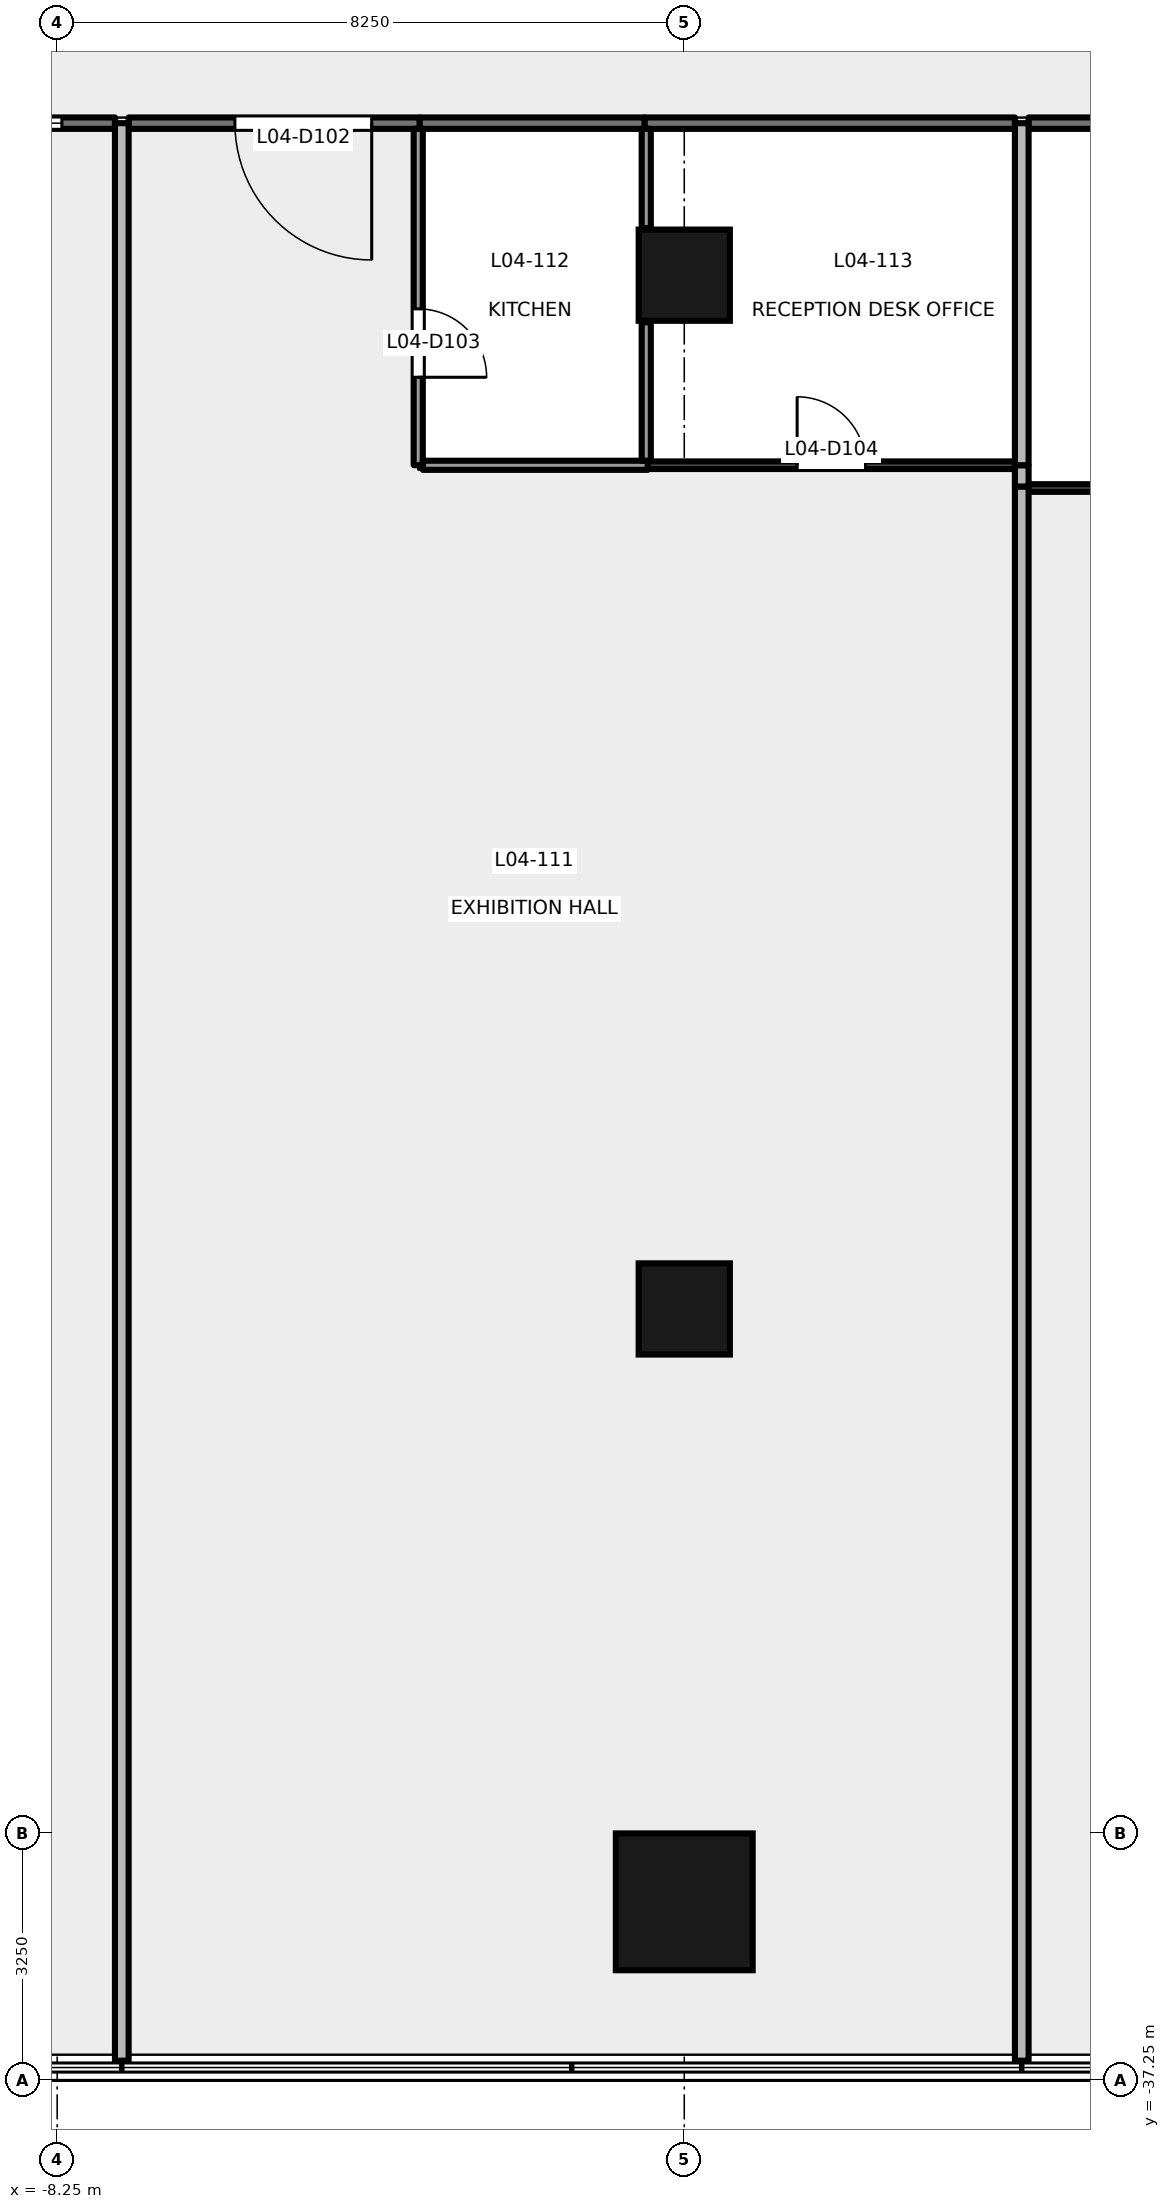
"""IFC4 building model, lengths in metres.
Left out: names, types, materials, properties, quantities, classifications, styles, units other than length and angle.
Written with IfcOpenShell. Run it as: python <this file> out.ifc"""

import sys

from ifc_helpers import new_model, si_unit, direction, frame, frame_2d, origin, origin_2d, place, context, subcontext, project, spatial, rectangle, extrude, element, fill, save


model = new_model("IFC4")
c1 = context("Model", 3, precision=1e-05, world=origin(), true_north=direction((0.0, 1.0)))
c2 = subcontext(c1, "Body", "Model", "MODEL_VIEW")
j1 = project(units=[si_unit("LENGTHUNIT", "METRE"), si_unit("PLANEANGLEUNIT", "RADIAN")], contexts=[c1])
p1 = place(None, origin())
s1 = spatial("IfcSite", under=j1, at=p1, CompositionType="ELEMENT")
p2 = place(p1, origin())
s2 = spatial("IfcBuilding", under=s1, at=p2, CompositionType="ELEMENT")
p3 = place(p2, frame((0.0, 0.0, 22.2)))
s3 = spatial("IfcBuildingStorey", under=s2, at=p3, CompositionType="ELEMENT", Elevation=22.2)
p4 = place(p3, frame((0.0, -34.9, -0.2), z_axis=(0.0, 0.0, 1.0), x_axis=(1.0, 0.0, 0.0)))
e1 = element("IfcColumn", 1, at=p4, inside=s3, PredefinedType="COLUMN", context=c2, shape_type="SweptSolid", body=[
    extrude(rectangle(XDim=1.8, YDim=1.8, at=origin_2d()), origin(), (0.0, 0.0, 1.0), 4.8),
])
for number, where, z_axis, x_axis in (
    (2, (0.0, -27.1, -0.2), (0.0, 0.0, 1.0), (1.0, 0.0, 0.0)),
    (3, (0.0, -13.5, -0.2), (0.0, 0.0, 1.0), (1.0, 0.0, 0.0)),
):
    element("IfcColumn", number, at=place(p3, frame(where, z_axis=z_axis, x_axis=x_axis)), inside=s3, PredefinedType="COLUMN", context=c2, shape_type="SweptSolid", body=[
        extrude(rectangle(XDim=1.2, YDim=1.2, at=origin_2d()), origin(), (0.0, 0.0, 1.0), 4.8),
    ])
p5 = place(p3, frame((-7.49, -11.5, 0.0), z_axis=(0.0, 0.0, 1.0), x_axis=(-1.0, 0.0, 0.0)))
e4 = element("IfcWall", 4, at=p5, inside=s3, PredefinedType="PARTITIONING", context=c2, shape_type="SweptSolid", body=[
    extrude(rectangle(XDim=8.19, YDim=0.15, at=frame_2d((4.095, 0.0))), origin(), (0.0, 0.0, 1.0), 3.6),
])
p6 = place(p5, frame((3.195, 0.0, 0.0)))
e5 = element("IfcOpeningElement", 5, at=p6, cuts=e4, PredefinedType="OPENING", context=c2, shape_type="SweptSolid", body=[
    extrude(rectangle(XDim=1.8, YDim=2.1, at=frame_2d((0.9, 1.05))), frame((0.0, 0.085, 0.0), z_axis=(0.0, -1.0, 0.0), x_axis=(1.0, 0.0, 0.0)), (0.0, 0.0, 1.0), 0.171),
])
p7 = place(p5, frame((0.698, 0.0, 0.0)))
e6 = element("IfcOpeningElement", 6, at=p7, cuts=e4, PredefinedType="OPENING", context=c2, shape_type="SweptSolid", body=[
    extrude(rectangle(XDim=1.8, YDim=2.4, at=frame_2d((0.9, 1.2))), frame((0.0, 0.085, 0.0), z_axis=(0.0, -1.0, 0.0), x_axis=(1.0, 0.0, 0.0)), (0.0, 0.0, 1.0), 0.171),
])
p8 = place(p3, frame((-3.48, -11.5, 0.0), z_axis=(0.0, 0.0, 1.0), x_axis=(-1.0, 0.0, 0.0)))
e7 = element("IfcWall", 7, at=p8, inside=s3, PredefinedType="PARTITIONING", context=c2, shape_type="SweptSolid", body=[
    extrude(rectangle(XDim=3.83, YDim=0.15, at=frame_2d((1.915, 0.0))), origin(), (0.0, 0.0, 1.0), 3.6),
])
p9 = place(p8, frame((0.632, 0.0, 0.0)))
e8 = element("IfcOpeningElement", 8, at=p9, cuts=e7, PredefinedType="OPENING", context=c2, shape_type="SweptSolid", body=[
    extrude(rectangle(XDim=1.8, YDim=2.1, at=frame_2d((0.9, 1.05))), frame((0.0, 0.085, 0.0), z_axis=(0.0, -1.0, 0.0), x_axis=(1.0, 0.0, 0.0)), (0.0, 0.0, 1.0), 0.171),
])
p10 = place(p3, frame((-0.52, -11.5, 0.0), z_axis=(0.0, 0.0, 1.0), x_axis=(-1.0, 0.0, 0.0)))
e9 = element("IfcWall", 9, at=p10, inside=s3, PredefinedType="PARTITIONING", context=c2, shape_type="SweptSolid", body=[
    extrude(rectangle(XDim=2.96, YDim=0.15, at=frame_2d((1.48, 0.0))), origin(), (0.0, 0.0, 1.0), 4.6),
])
p11 = place(p3, frame((4.35, -11.5, 0.0), z_axis=(0.0, 0.0, 1.0), x_axis=(-1.0, 0.0, 0.0)))
e10 = element("IfcWall", 10, at=p11, inside=s3, PredefinedType="PARTITIONING", context=c2, shape_type="SweptSolid", body=[
    extrude(rectangle(XDim=4.87, YDim=0.15, at=frame_2d((2.435, 0.0))), origin(), (0.0, 0.0, 1.0), 3.6),
])
p12 = place(p3, frame((13.46, -11.5, 0.0), z_axis=(0.0, 0.0, 1.0), x_axis=(-1.0, 0.0, 0.0)))
e11 = element("IfcWall", 11, at=p12, inside=s3, PredefinedType="PARTITIONING", context=c2, shape_type="SweptSolid", body=[
    extrude(rectangle(XDim=8.93, YDim=0.15, at=frame_2d((4.465, 0.0))), origin(), (0.0, 0.0, 1.0), 3.6),
])
p13 = place(p3, frame((-7.4, -11.5, 0.0), z_axis=(0.0, 0.0, 1.0), x_axis=(0.0, -1.0, 0.0)))
e12 = element("IfcWall", 12, at=p13, inside=s3, PredefinedType="PARTITIONING", context=c2, shape_type="SweptSolid", body=[
    extrude(rectangle(XDim=25.49, YDim=0.18, at=frame_2d((12.745, 0.0))), origin(), (0.0, 0.0, 1.0), 3.5),
])
p14 = place(p3, frame((-3.5, -11.575, 0.0), z_axis=(0.0, 0.0, 1.0), x_axis=(0.0, -1.0, 0.0)))
e13 = element("IfcWall", 13, at=p14, inside=s3, PredefinedType="PARTITIONING", context=c2, shape_type="SweptSolid", body=[
    extrude(rectangle(XDim=4.425, YDim=0.12, at=frame_2d((2.212, 0.0))), origin(), (0.0, 0.0, 1.0), 4.6),
])
p15 = place(p14, frame((2.368, 0.0, 0.0)))
e14 = element("IfcOpeningElement", 14, at=p15, cuts=e13, PredefinedType="OPENING", context=c2, shape_type="SweptSolid", body=[
    extrude(rectangle(XDim=0.9, YDim=2.1, at=frame_2d((0.45, 1.05))), frame((0.0, 0.071, 0.0), z_axis=(0.0, -1.0, 0.0), x_axis=(1.0, 0.0, 0.0)), (0.0, 0.0, 1.0), 0.141),
])
p16 = place(p3, frame((-3.44, -16.001, 0.0), z_axis=(0.0, 0.0, 1.0), x_axis=(1.0, 0.0, 0.0)))
e15 = element("IfcWall", 15, at=p16, inside=s3, PredefinedType="PARTITIONING", context=c2, shape_type="SweptSolid", body=[
    extrude(rectangle(XDim=2.96, YDim=0.12, at=frame_2d((1.48, 0.0))), origin(), (0.0, 0.0, 1.0), 4.6),
])
p17 = place(p3, frame((-0.48, -16.0, 0.0), z_axis=(0.0, 0.0, 1.0), x_axis=(1.0, 0.0, 0.0)))
e16 = element("IfcWall", 16, at=p17, inside=s3, PredefinedType="PARTITIONING", context=c2, shape_type="SweptSolid", body=[
    extrude(rectangle(XDim=4.83, YDim=0.1, at=frame_2d((2.415, 0.0))), origin(), (0.0, 0.0, 1.0), 3.6),
])
p18 = place(p17, frame((1.965, 0.0, 0.0)))
e17 = element("IfcOpeningElement", 17, at=p18, cuts=e16, PredefinedType="OPENING", context=c2, shape_type="SweptSolid", body=[
    extrude(rectangle(XDim=0.9, YDim=2.1, at=frame_2d((0.45, 1.05))), frame((0.0, 0.061, 0.0), z_axis=(0.0, -1.0, 0.0), x_axis=(1.0, 0.0, 0.0)), (0.0, 0.0, 1.0), 0.121),
])
p19 = place(p3, frame((4.44, -16.28, 0.0), z_axis=(0.0, 0.0, 1.0), x_axis=(0.0, -1.0, 0.0)))
e18 = element("IfcWall", 18, at=p19, inside=s3, PredefinedType="PARTITIONING", context=c2, shape_type="SweptSolid", body=[
    extrude(rectangle(XDim=20.71, YDim=0.18, at=frame_2d((10.355, 0.0))), origin(), (0.0, 0.0, 1.0), 3.5),
])
p20 = place(p3, frame((4.44, -16.0, 0.0), z_axis=(0.0, 0.0, 1.0), x_axis=(0.0, -1.0, 0.0)))
e19 = element("IfcWall", 19, at=p20, inside=s3, PredefinedType="PARTITIONING", context=c2, shape_type="SweptSolid", body=[
    extrude(rectangle(XDim=0.28, YDim=0.18, at=frame_2d((0.14, 0.0))), origin(), (0.0, 0.0, 1.0), 3.6),
])
p21 = place(p3, frame((-0.5, -11.575, 0.0), z_axis=(0.0, 0.0, 1.0), x_axis=(0.0, -1.0, 0.0)))
e20 = element("IfcWall", 20, at=p21, inside=s3, PredefinedType="PARTITIONING", context=c2, shape_type="SweptSolid", body=[
    extrude(rectangle(XDim=1.305, YDim=0.12, at=frame_2d((0.652, 0.0))), origin(), (0.0, 0.0, 1.0), 4.6),
])
p22 = place(p3, frame((-0.5, -14.12, 0.0), z_axis=(0.0, 0.0, 1.0), x_axis=(0.0, -1.0, 0.0)))
e21 = element("IfcWall", 21, at=p22, inside=s3, PredefinedType="PARTITIONING", context=c2, shape_type="SweptSolid", body=[
    extrude(rectangle(XDim=1.821, YDim=0.12, at=frame_2d((0.91, 0.0))), origin(), (0.0, 0.0, 1.0), 4.6),
])
p23 = place(p3, frame((4.44, -11.5, 0.0), z_axis=(0.0, 0.0, 1.0), x_axis=(0.0, -1.0, 0.0)))
e22 = element("IfcWall", 22, at=p23, inside=s3, PredefinedType="PARTITIONING", context=c2, shape_type="SweptSolid", body=[
    extrude(rectangle(XDim=4.5, YDim=0.18, at=frame_2d((2.25, 0.0))), origin(), (0.0, 0.0, 1.0), 3.6),
])
p24 = place(p3, frame((4.53, -16.3, 0.0), z_axis=(0.0, 0.0, 1.0), x_axis=(1.0, 0.0, 0.0)))
e23 = element("IfcWall", 23, at=p24, inside=s3, PredefinedType="PARTITIONING", context=c2, shape_type="SweptSolid", body=[
    extrude(rectangle(XDim=8.91, YDim=0.1, at=frame_2d((4.455, 0.0))), origin(), (0.0, 0.0, 1.0), 3.6),
])
p25 = place(p24, frame((4.055, 0.0, 0.0)))
e24 = element("IfcOpeningElement", 24, at=p25, cuts=e23, PredefinedType="OPENING", context=c2, shape_type="SweptSolid", body=[
    extrude(rectangle(XDim=0.8, YDim=2.1, at=frame_2d((0.4, 1.05))), frame((0.0, 0.061, 0.0), z_axis=(0.0, -1.0, 0.0), x_axis=(1.0, 0.0, 0.0)), (0.0, 0.0, 1.0), 0.121),
])
p26 = place(p9, origin())
e25 = element("IfcDoor", 25, at=p26, inside=s3, OperationType="DOUBLE_DOOR_SINGLE_SWING", PredefinedType="DOOR", context=c2, shape_type="SweptSolid", body=[
    extrude(rectangle(XDim=1.8, YDim=2.1, at=frame_2d((0.9, 1.05))), frame((0.0, 0.025, 0.0), z_axis=(0.0, -1.0, 0.0), x_axis=(1.0, 0.0, 0.0)), (0.0, 0.0, 1.0), 0.05),
])
fill(e8, e25)
p27 = place(p15, origin())
e26 = element("IfcDoor", 26, at=p27, inside=s3, OperationType="SINGLE_SWING_RIGHT", PredefinedType="DOOR", context=c2, shape_type="SweptSolid", body=[
    extrude(rectangle(XDim=0.9, YDim=2.1, at=frame_2d((0.45, 1.05))), frame((0.0, 0.025, 0.0), z_axis=(0.0, -1.0, 0.0), x_axis=(1.0, 0.0, 0.0)), (0.0, 0.0, 1.0), 0.05),
])
fill(e14, e26)
p28 = place(p18, origin())
e27 = element("IfcDoor", 27, at=p28, inside=s3, OperationType="SINGLE_SWING_LEFT", PredefinedType="DOOR", context=c2, shape_type="SweptSolid", body=[
    extrude(rectangle(XDim=0.9, YDim=2.1, at=frame_2d((0.45, 1.05))), frame((0.0, 0.025, 0.0), z_axis=(0.0, -1.0, 0.0), x_axis=(1.0, 0.0, 0.0)), (0.0, 0.0, 1.0), 0.05),
])
fill(e17, e27)
p29 = place(p7, origin())
e28 = element("IfcWindow", 28, at=p29, inside=s3, PartitioningType="SINGLE_PANEL", PredefinedType="WINDOW", context=c2, shape_type="SweptSolid", body=[
    extrude(rectangle(XDim=1.8, YDim=2.4, at=frame_2d((0.9, 1.2))), frame((0.0, 0.03, 0.0), z_axis=(0.0, -1.0, 0.0), x_axis=(1.0, 0.0, 0.0)), (0.0, 0.0, 1.0), 0.06),
])
fill(e6, e28)
save(model, sys.argv[1])
